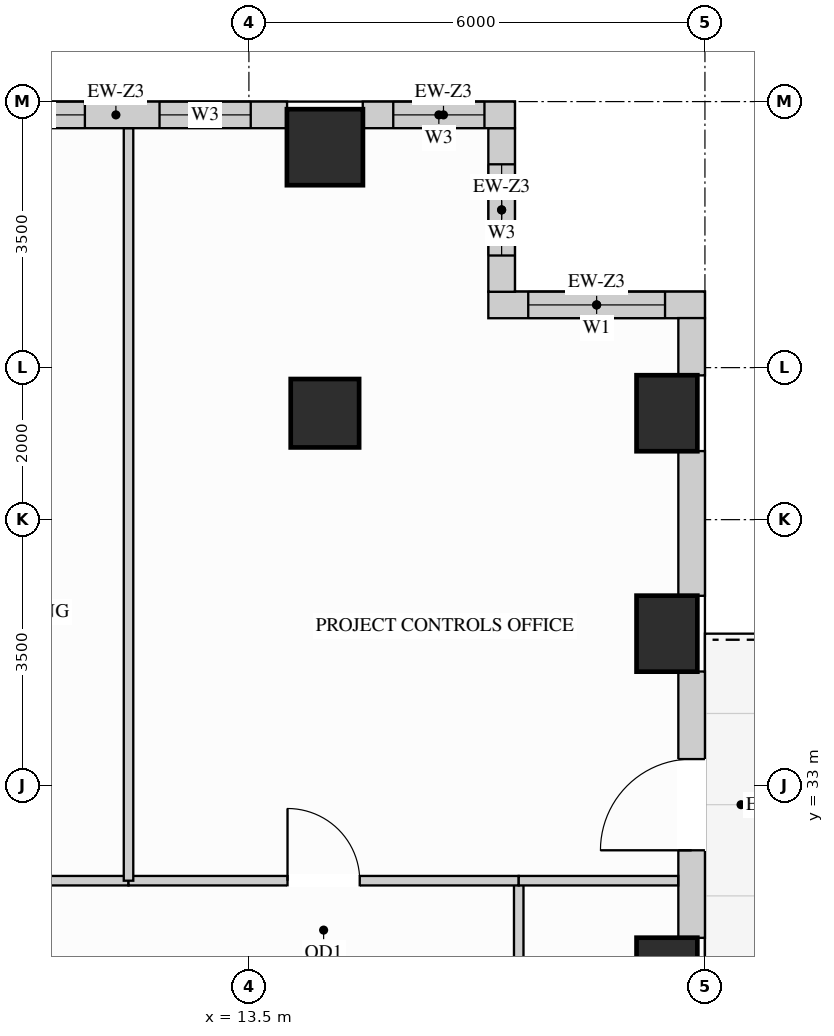
"""IFC4 building model, lengths in metres.
Left out: names, types, materials, properties, quantities, classifications, styles, units other than length and angle.
Written with IfcOpenShell. Run it as: python <this file> out.ifc"""

import sys

from ifc_helpers import new_model, si_unit, direction, frame, frame_2d, origin, origin_2d, place, context, subcontext, project, spatial, rectangle, extrude, source, transform, mapped, element, fill, save


model = new_model("IFC4")
c1 = context("Model", 3, precision=1e-05, world=origin(), true_north=direction((0.0, 1.0)))
c2 = subcontext(c1, "Body", "Model", "MODEL_VIEW")
j1 = project(units=[si_unit("LENGTHUNIT", "METRE"), si_unit("PLANEANGLEUNIT", "RADIAN")], contexts=[c1])
p1 = place(None, origin())
s1 = spatial("IfcSite", under=j1, at=p1, CompositionType="ELEMENT")
p2 = place(p1, origin())
s2 = spatial("IfcBuilding", under=s1, at=p2, CompositionType="ELEMENT")
p3 = place(p2, frame((0.0, 0.0, 200.7)))
s3 = spatial("IfcBuildingStorey", under=s2, at=p3, CompositionType="ELEMENT", Elevation=200.7)
m1 = source(origin(), c2, "Body", "SweptSolid", [
    extrude(rectangle(XDim=0.9, YDim=0.9, at=origin_2d()), origin(), (0.0, 0.0, 1.0), 3.4),
])
p4 = place(p3, frame((14.5, 37.9, 0.0), z_axis=(0.0, 0.0, 1.0), x_axis=(1.0, 0.0, 0.0)))
e1 = element("IfcColumn", 1, at=p4, inside=s3, PredefinedType="COLUMN", context=c2, shape_type="MappedRepresentation", body=[
    mapped(m1, transform((0.0, 0.0, 0.0), x_axis=(1.0, 0.0, 0.0), y_axis=(0.0, 1.0, 0.0), z_axis=(0.0, 0.0, 1.0))),
])
m2 = source(origin(), c2, "Body", "SweptSolid", [
    extrude(rectangle(XDim=0.8, YDim=1.0, at=origin_2d()), origin(), (0.0, 0.0, 1.0), 3.4),
])
for number, where, z_axis, x_axis in (
    (2, (19.0, 30.5, 0.0), (0.0, 0.0, 1.0), (1.0, 0.0, 0.0)),
    (3, (19.0, 35.0, 0.0), (0.0, 0.0, 1.0), (1.0, 0.0, 0.0)),
    (4, (19.0, 37.9, 0.0), (0.0, 0.0, 1.0), (1.0, 0.0, 0.0)),
):
    element("IfcColumn", number, at=place(p3, frame(where, z_axis=z_axis, x_axis=x_axis)), inside=s3, PredefinedType="COLUMN", context=c2, shape_type="MappedRepresentation", body=[
        mapped(m2, transform((0.0, 0.0, 0.0), x_axis=(1.0, 0.0, 0.0), y_axis=(0.0, 1.0, 0.0), z_axis=(0.0, 0.0, 1.0))),
    ])
m3 = source(origin(), c2, "Body", "SweptSolid", [
    extrude(rectangle(XDim=1.0, YDim=1.0, at=origin_2d()), origin(), (0.0, 0.0, 1.0), 3.4),
])
p5 = place(p3, frame((14.5, 41.4, 0.0), z_axis=(0.0, 0.0, 1.0), x_axis=(1.0, 0.0, 0.0)))
e5 = element("IfcColumn", 5, at=p5, inside=s3, PredefinedType="COLUMN", context=c2, shape_type="MappedRepresentation", body=[
    mapped(m3, transform((0.0, 0.0, 0.0), x_axis=(1.0, 0.0, 0.0), y_axis=(0.0, 1.0, 0.0), z_axis=(0.0, 0.0, 1.0))),
])
p6 = place(p3, frame((19.5, 39.325, 0.0), z_axis=(0.0, 0.0, 1.0), x_axis=(-1.0, 0.0, 0.0)))
e6 = element("IfcWall", 6, at=p6, inside=s3, PredefinedType="SOLIDWALL", context=c2, shape_type="SweptSolid", body=[
    extrude(rectangle(XDim=2.85, YDim=0.35, at=frame_2d((1.425, 0.0))), origin(), (0.0, 0.0, 1.0), 3.385),
])
p7 = place(p6, frame((0.525, 0.0, 0.78)))
e7 = element("IfcOpeningElement", 7, at=p7, cuts=e6, PredefinedType="OPENING", context=c2, shape_type="SweptSolid", body=[
    extrude(rectangle(XDim=1.8, YDim=2.1, at=frame_2d((0.9, 1.05))), frame((0.0, 0.185, 0.0), z_axis=(0.0, -1.0, 0.0), x_axis=(1.0, 0.0, 0.0)), (0.0, 0.0, 1.0), 0.37),
])
p8 = place(p3, frame((16.825, 39.498, 0.0), z_axis=(0.0, 0.0, 1.0), x_axis=(0.0, 1.0, 0.0)))
e8 = element("IfcWall", 8, at=p8, inside=s3, PredefinedType="SOLIDWALL", context=c2, shape_type="SweptSolid", body=[
    extrude(rectangle(XDim=2.154, YDim=0.35, at=frame_2d((1.077, 0.0))), origin(), (0.0, 0.0, 1.0), 3.385),
])
p9 = place(p8, frame((0.477, 0.0, 0.78)))
e9 = element("IfcOpeningElement", 9, at=p9, cuts=e8, PredefinedType="OPENING", context=c2, shape_type="SweptSolid", body=[
    extrude(rectangle(XDim=1.2, YDim=2.1, at=frame_2d((0.6, 1.05))), frame((0.0, 0.185, 0.0), z_axis=(0.0, -1.0, 0.0), x_axis=(1.0, 0.0, 0.0)), (0.0, 0.0, 1.0), 0.37),
])
p10 = place(p3, frame((17.0, 41.825, 0.0), z_axis=(0.0, 0.0, 1.0), x_axis=(-1.0, 0.0, 0.0)))
e10 = element("IfcWall", 10, at=p10, inside=s3, PredefinedType="SOLIDWALL", context=c2, shape_type="SweptSolid", body=[
    extrude(rectangle(XDim=2.002, YDim=0.35, at=frame_2d((1.001, 0.0))), origin(), (0.0, 0.0, 1.0), 3.385),
])
p11 = place(p10, frame((0.401, 0.0, 0.78)))
e11 = element("IfcOpeningElement", 11, at=p11, cuts=e10, PredefinedType="OPENING", context=c2, shape_type="SweptSolid", body=[
    extrude(rectangle(XDim=1.2, YDim=2.1, at=frame_2d((0.6, 1.05))), frame((0.0, 0.185, 0.0), z_axis=(0.0, -1.0, 0.0), x_axis=(1.0, 0.0, 0.0)), (0.0, 0.0, 1.0), 0.37),
])
p12 = place(p3, frame((14.002, 41.825, 0.0), z_axis=(0.0, 0.0, 1.0), x_axis=(-1.0, 0.0, 0.0)))
e12 = element("IfcWall", 12, at=p12, inside=s3, PredefinedType="SOLIDWALL", context=c2, shape_type="SweptSolid", body=[
    extrude(rectangle(XDim=4.504, YDim=0.35, at=frame_2d((2.252, 0.0))), origin(), (0.0, 0.0, 1.0), 2.612),
])
p13 = place(p12, frame((0.478, 0.0, 0.78)))
e13 = element("IfcOpeningElement", 13, at=p13, cuts=e12, PredefinedType="OPENING", context=c2, shape_type="SweptSolid", body=[
    extrude(rectangle(XDim=1.2, YDim=1.652, at=frame_2d((0.6, 0.826))), frame((0.0, 0.185, 0.0), z_axis=(0.0, -1.0, 0.0), x_axis=(1.0, 0.0, 0.0)), (0.0, 0.0, 1.0), 0.37),
])
p14 = place(p12, frame((2.66, 0.0, 0.78)))
e14 = element("IfcOpeningElement", 14, at=p14, cuts=e12, PredefinedType="OPENING", context=c2, shape_type="SweptSolid", body=[
    extrude(rectangle(XDim=1.2, YDim=1.652, at=frame_2d((0.6, 0.826))), frame((0.0, 0.185, 0.0), z_axis=(0.0, -1.0, 0.0), x_axis=(1.0, 0.0, 0.0)), (0.0, 0.0, 1.0), 0.37),
])
p15 = place(p3, frame((19.325, 30.998, 0.0), z_axis=(0.0, 0.0, 1.0), x_axis=(0.0, 1.0, 0.0)))
e15 = element("IfcWall", 15, at=p15, inside=s3, PredefinedType="SOLIDWALL", context=c2, shape_type="SweptSolid", body=[
    extrude(rectangle(XDim=3.504, YDim=0.35, at=frame_2d((1.752, 0.0))), origin(), (0.0, 0.0, 1.0), 2.612),
])
p16 = place(p15, frame((1.152, 0.0, 0.0)))
e16 = element("IfcOpeningElement", 16, at=p16, cuts=e15, PredefinedType="OPENING", context=c2, shape_type="SweptSolid", body=[
    extrude(rectangle(XDim=1.2, YDim=2.15, at=frame_2d((0.6, 1.075))), frame((0.0, 0.185, 0.0), z_axis=(0.0, -1.0, 0.0), x_axis=(1.0, 0.0, 0.0)), (0.0, 0.0, 1.0), 0.37),
])
m4 = source(origin(), c2, "Body", "SweptSolid", [
    extrude(rectangle(XDim=1.904, YDim=0.35, at=frame_2d((0.952, 0.0))), origin(), (0.0, 0.0, 1.0), 2.612),
])
p17 = place(p3, frame((19.325, 35.498, 0.0), z_axis=(0.0, 0.0, 1.0), x_axis=(0.0, 1.0, 0.0)))
e17 = element("IfcWall", 17, at=p17, inside=s3, PredefinedType="SOLIDWALL", context=c2, shape_type="MappedRepresentation", body=[
    mapped(m4, transform((0.0, 0.0, 0.0), x_axis=(1.0, 0.0, 0.0), y_axis=(0.0, 1.0, 0.0), z_axis=(0.0, 0.0, 1.0))),
])
m5 = source(origin(), c2, "Body", "SweptSolid", [
    extrude(rectangle(XDim=0.754, YDim=0.35, at=frame_2d((0.377, 0.0))), origin(), (0.0, 0.0, 1.0), 3.385),
])
p18 = place(p3, frame((19.325, 38.398, 0.0), z_axis=(0.0, 0.0, 1.0), x_axis=(0.0, 1.0, 0.0)))
e18 = element("IfcWall", 18, at=p18, inside=s3, PredefinedType="SOLIDWALL", context=c2, shape_type="MappedRepresentation", body=[
    mapped(m5, transform((0.0, 0.0, 0.0), x_axis=(1.0, 0.0, 0.0), y_axis=(0.0, 1.0, 0.0), z_axis=(0.0, 0.0, 1.0))),
])
p19 = place(p3, frame((17.05, 26.05, 0.0), z_axis=(0.0, 0.0, 1.0), x_axis=(0.0, 1.0, 0.0)))
e19 = element("IfcWall", 19, at=p19, inside=s3, PredefinedType="PARTITIONING", context=c2, shape_type="SweptSolid", body=[
    extrude(rectangle(XDim=5.7, YDim=0.125, at=frame_2d((2.85, 0.0))), origin(), (0.0, 0.0, 1.0), 3.385),
])
p20 = place(p19, frame((2.375, 0.0, 0.0)))
e20 = element("IfcOpeningElement", 20, at=p20, cuts=e19, PredefinedType="OPENING", context=c2, shape_type="SweptSolid", body=[
    extrude(rectangle(XDim=0.95, YDim=2.15, at=frame_2d((0.475, 1.075))), frame((0.0, 0.073, 0.0), z_axis=(0.0, -1.0, 0.0), x_axis=(1.0, 0.0, 0.0)), (0.0, 0.0, 1.0), 0.145),
])
p21 = place(p3, frame((7.121, 31.75, 0.0), z_axis=(0.0, 0.0, 1.0), x_axis=(1.0, 0.0, 0.0)))
e21 = element("IfcWall", 21, at=p21, inside=s3, PredefinedType="PARTITIONING", context=c2, shape_type="SweptSolid", body=[
    extrude(rectangle(XDim=4.795, YDim=0.125, at=frame_2d((2.397, 0.0))), origin(), (0.0, 0.0, 1.0), 2.848),
])
p22 = place(p21, frame((1.923, 0.0, 0.0)))
e22 = element("IfcOpeningElement", 22, at=p22, cuts=e21, PredefinedType="OPENING", context=c2, shape_type="SweptSolid", body=[
    extrude(rectangle(XDim=0.95, YDim=2.15, at=frame_2d((0.475, 1.075))), frame((0.0, 0.073, 0.0), z_axis=(0.0, -1.0, 0.0), x_axis=(1.0, 0.0, 0.0)), (0.0, 0.0, 1.0), 0.145),
])
p23 = place(p3, frame((11.916, 31.75, 0.0), z_axis=(0.0, 0.0, 1.0), x_axis=(1.0, 0.0, 0.0)))
e23 = element("IfcWall", 23, at=p23, inside=s3, PredefinedType="PARTITIONING", context=c2, shape_type="SweptSolid", body=[
    extrude(rectangle(XDim=5.134, YDim=0.125, at=frame_2d((2.567, 0.0))), origin(), (0.0, 0.0, 1.0), 2.848),
])
p24 = place(p23, frame((2.092, 0.0, 0.0)))
e24 = element("IfcOpeningElement", 24, at=p24, cuts=e23, PredefinedType="OPENING", context=c2, shape_type="SweptSolid", body=[
    extrude(rectangle(XDim=0.95, YDim=2.15, at=frame_2d((0.475, 1.075))), frame((0.0, 0.073, 0.0), z_axis=(0.0, -1.0, 0.0), x_axis=(1.0, 0.0, 0.0)), (0.0, 0.0, 1.0), 0.145),
])
m6 = source(origin(), c2, "Body", "SweptSolid", [
    extrude(rectangle(XDim=2.098, YDim=0.125, at=frame_2d((1.049, 0.0))), origin(), (0.0, 0.0, 1.0), 2.848),
])
p25 = place(p3, frame((17.05, 31.75, 0.0), z_axis=(0.0, 0.0, 1.0), x_axis=(1.0, 0.0, 0.0)))
e25 = element("IfcWall", 25, at=p25, inside=s3, PredefinedType="PARTITIONING", context=c2, shape_type="MappedRepresentation", body=[
    mapped(m6, transform((0.0, 0.0, 0.0), x_axis=(1.0, 0.0, 0.0), y_axis=(0.0, 1.0, 0.0), z_axis=(0.0, 0.0, 1.0))),
])
m7 = source(origin(), c2, "Body", "SweptSolid", [
    extrude(rectangle(XDim=9.898, YDim=0.125, at=frame_2d((4.949, 0.0))), origin(), (0.0, 0.0, 1.0), 3.385),
])
p26 = place(p3, frame((11.916, 31.75, 0.0), z_axis=(0.0, 0.0, 1.0), x_axis=(0.0, 1.0, 0.0)))
e26 = element("IfcWall", 26, at=p26, inside=s3, PredefinedType="PARTITIONING", context=c2, shape_type="MappedRepresentation", body=[
    mapped(m7, transform((0.0, 0.0, 0.0), x_axis=(1.0, 0.0, 0.0), y_axis=(0.0, 1.0, 0.0), z_axis=(0.0, 0.0, 1.0))),
])
m8 = source(origin(), c2, "Body", "SweptSolid", [
    extrude(rectangle(XDim=1.2, YDim=2.15, at=frame_2d((0.6, 1.075))), frame((0.0, 0.025, 0.0), z_axis=(0.0, -1.0, 0.0), x_axis=(1.0, 0.0, 0.0)), (0.0, 0.0, 1.0), 0.05),
])
p27 = place(p16, frame((1.2, 0.0, 0.0), z_axis=(0.0, 0.0, 1.0), x_axis=(-1.0, 0.0, 0.0)))
e27 = element("IfcDoor", 27, at=p27, inside=s3, OperationType="SINGLE_SWING_LEFT", PredefinedType="DOOR", context=c2, shape_type="MappedRepresentation", body=[
    mapped(m8, transform((0.0, 0.0, 0.0), x_axis=(1.0, 0.0, 0.0), y_axis=(0.0, 1.0, 0.0), z_axis=(0.0, 0.0, 1.0))),
])
fill(e16, e27)
m9 = source(origin(), c2, "Body", "SweptSolid", [
    extrude(rectangle(XDim=0.95, YDim=2.15, at=frame_2d((0.475, 1.075))), frame((0.0, 0.025, 0.0), z_axis=(0.0, -1.0, 0.0), x_axis=(1.0, 0.0, 0.0)), (0.0, 0.0, 1.0), 0.05),
])
p28 = place(p24, origin())
e28 = element("IfcDoor", 28, at=p28, inside=s3, OperationType="SINGLE_SWING_LEFT", PredefinedType="DOOR", context=c2, shape_type="MappedRepresentation", body=[
    mapped(m9, transform((0.0, 0.0, 0.0), x_axis=(1.0, 0.0, 0.0), y_axis=(0.0, 1.0, 0.0), z_axis=(0.0, 0.0, 1.0))),
])
fill(e24, e28)
m10 = source(origin(), c2, "Body", "SweptSolid", [
    extrude(rectangle(XDim=1.8, YDim=2.1, at=frame_2d((0.9, 1.05))), frame((0.0, 0.03, 0.0), z_axis=(0.0, -1.0, 0.0), x_axis=(1.0, 0.0, 0.0)), (0.0, 0.0, 1.0), 0.06),
])
p29 = place(p7, origin())
e29 = element("IfcWindow", 29, at=p29, inside=s3, PartitioningType="SINGLE_PANEL", PredefinedType="WINDOW", context=c2, shape_type="MappedRepresentation", body=[
    mapped(m10, transform((0.0, 0.0, 0.0), x_axis=(1.0, 0.0, 0.0), y_axis=(0.0, 1.0, 0.0), z_axis=(0.0, 0.0, 1.0))),
])
fill(e7, e29)
m11 = source(origin(), c2, "Body", "SweptSolid", [
    extrude(rectangle(XDim=1.2, YDim=2.1, at=frame_2d((0.6, 1.05))), frame((0.0, 0.03, 0.0), z_axis=(0.0, -1.0, 0.0), x_axis=(1.0, 0.0, 0.0)), (0.0, 0.0, 1.0), 0.06),
])
p30 = place(p9, origin())
e30 = element("IfcWindow", 30, at=p30, inside=s3, PartitioningType="SINGLE_PANEL", PredefinedType="WINDOW", context=c2, shape_type="MappedRepresentation", body=[
    mapped(m11, transform((0.0, 0.0, 0.0), x_axis=(1.0, 0.0, 0.0), y_axis=(0.0, 1.0, 0.0), z_axis=(0.0, 0.0, 1.0))),
])
fill(e9, e30)
p31 = place(p11, origin())
e31 = element("IfcWindow", 31, at=p31, inside=s3, PartitioningType="SINGLE_PANEL", PredefinedType="WINDOW", context=c2, shape_type="MappedRepresentation", body=[
    mapped(m11, transform((0.0, 0.0, 0.0), x_axis=(1.0, 0.0, 0.0), y_axis=(0.0, 1.0, 0.0), z_axis=(0.0, 0.0, 1.0))),
])
fill(e11, e31)
m12 = source(origin(), c2, "Body", "SweptSolid", [
    extrude(rectangle(XDim=1.2, YDim=1.652, at=frame_2d((0.6, 0.826))), frame((0.0, 0.03, 0.0), z_axis=(0.0, -1.0, 0.0), x_axis=(1.0, 0.0, 0.0)), (0.0, 0.0, 1.0), 0.06),
])
p32 = place(p13, origin())
e32 = element("IfcWindow", 32, at=p32, inside=s3, PartitioningType="SINGLE_PANEL", PredefinedType="WINDOW", context=c2, shape_type="MappedRepresentation", body=[
    mapped(m12, transform((0.0, 0.0, 0.0), x_axis=(1.0, 0.0, 0.0), y_axis=(0.0, 1.0, 0.0), z_axis=(0.0, 0.0, 1.0))),
])
fill(e13, e32)
p33 = place(p14, origin())
e33 = element("IfcWindow", 33, at=p33, inside=s3, PartitioningType="SINGLE_PANEL", PredefinedType="WINDOW", context=c2, shape_type="MappedRepresentation", body=[
    mapped(m12, transform((0.0, 0.0, 0.0), x_axis=(1.0, 0.0, 0.0), y_axis=(0.0, 1.0, 0.0), z_axis=(0.0, 0.0, 1.0))),
])
fill(e14, e33)
save(model, sys.argv[1])
